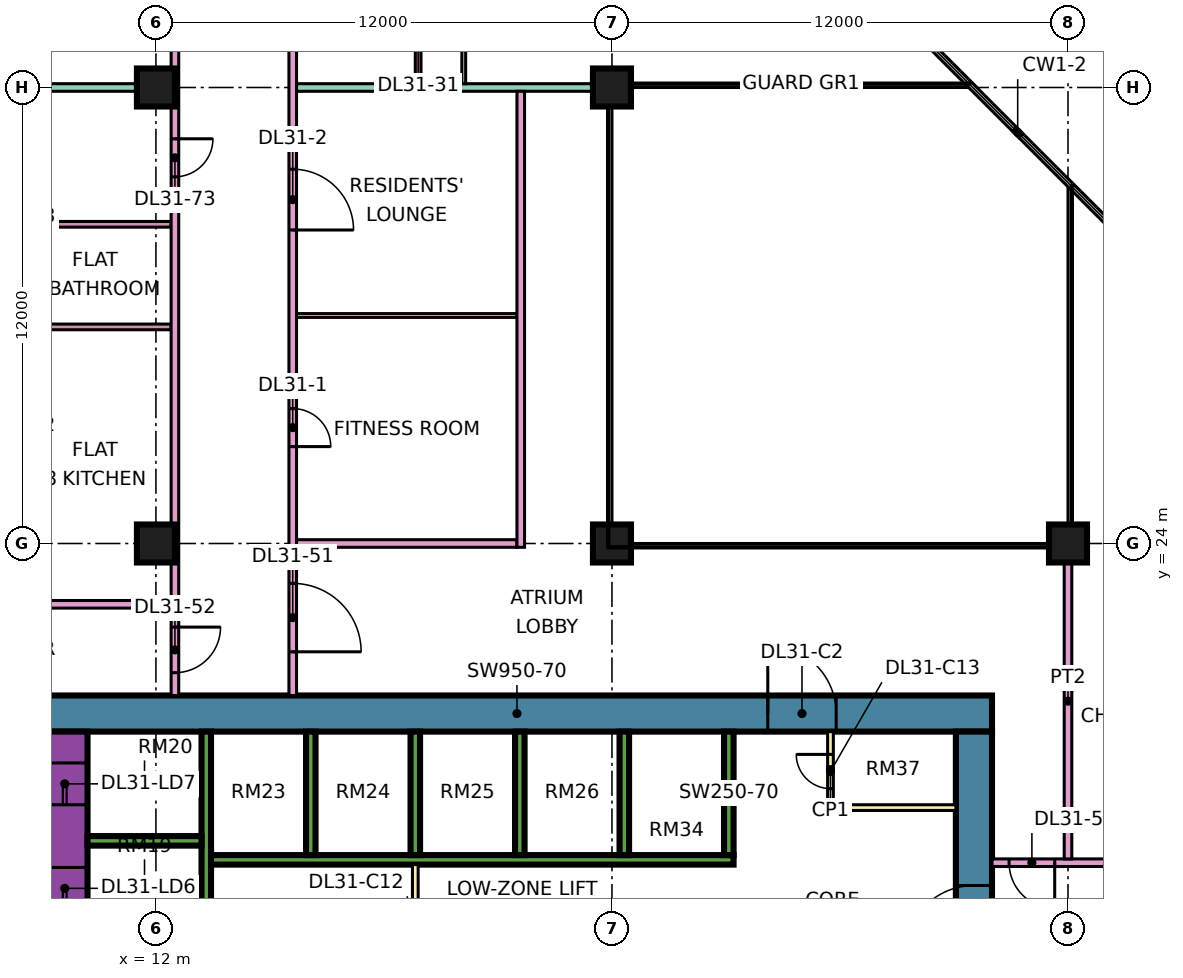
"""IFC4 building model, lengths in metres.
Left out: names, types, materials, properties, quantities, classifications, styles, units other than length and angle.
Written with IfcOpenShell. Run it as: python <this file> out.ifc"""

import sys

from ifc_helpers import new_model, si_unit, direction, frame, frame_2d, origin, origin_2d, place, context, subcontext, project, spatial, rectangle, extrude, element, fill, save


model = new_model("IFC4")
c1 = context("Model", 3, precision=1e-05, world=origin(), true_north=direction((0.0, 1.0)))
c2 = subcontext(c1, "Body", "Model", "MODEL_VIEW")
j1 = project(units=[si_unit("LENGTHUNIT", "METRE"), si_unit("PLANEANGLEUNIT", "RADIAN")], contexts=[c1])
p1 = place(None, origin())
s1 = spatial("IfcSite", under=j1, at=p1, CompositionType="ELEMENT")
p2 = place(p1, origin())
s2 = spatial("IfcBuilding", under=s1, at=p2, CompositionType="ELEMENT")
p3 = place(p2, frame((0.0, 0.0, 133.15)))
s3 = spatial("IfcBuildingStorey", under=s2, at=p3, CompositionType="ELEMENT", Elevation=133.15)
for number, where, z_axis, x_axis in (
    (1, (12.0, 24.0, 0.0), (0.0, 0.0, 1.0), (1.0, 0.0, 0.0)),
    (2, (12.0, 36.0, 0.0), (0.0, 0.0, 1.0), (1.0, 0.0, 0.0)),
    (3, (24.0, 24.0, 0.0), (0.0, 0.0, 1.0), (1.0, 0.0, 0.0)),
    (4, (24.0, 36.0, 0.0), (0.0, 0.0, 1.0), (1.0, 0.0, 0.0)),
    (5, (36.0, 24.0, 0.0), (0.0, 0.0, 1.0), (1.0, 0.0, 0.0)),
):
    element("IfcColumn", number, at=place(p3, frame(where, z_axis=z_axis, x_axis=x_axis)), inside=s3, PredefinedType="COLUMN", context=c2, shape_type="SweptSolid", body=[
        extrude(rectangle(XDim=1.0, YDim=1.0, at=origin_2d()), origin(), (0.0, 0.0, 1.0), 3.75),
    ])
p4 = place(p3, frame((9.0, 19.525, 0.0), z_axis=(0.0, 0.0, 1.0), x_axis=(1.0, 0.0, 0.0)))
e6 = element("IfcWall", 6, at=p4, inside=s3, PredefinedType="SHEAR", context=c2, shape_type="SweptSolid", body=[
    extrude(rectangle(XDim=25.0, YDim=0.95, at=frame_2d((12.5, 0.0))), origin(), (0.0, 0.0, 1.0), 3.75),
])
p5 = place(p4, frame((19.1, 0.0, 0.0)))
e7 = element("IfcOpeningElement", 7, at=p5, cuts=e6, PredefinedType="OPENING", context=c2, shape_type="SweptSolid", body=[
    extrude(rectangle(XDim=1.8, YDim=2.4, at=frame_2d((0.9, 1.2))), frame((0.0, 0.485, 0.0), z_axis=(0.0, -1.0, 0.0), x_axis=(1.0, 0.0, 0.0)), (0.0, 0.0, 1.0), 0.97),
])
p6 = place(p3, frame((9.6, 7.95, 0.0), z_axis=(0.0, 0.0, 1.0), x_axis=(0.0, 1.0, 0.0)))
e8 = element("IfcWall", 8, at=p6, inside=s3, PredefinedType="SHEAR", context=c2, shape_type="SweptSolid", body=[
    extrude(rectangle(XDim=11.1, YDim=1.2, at=frame_2d((5.55, 0.0))), origin(), (0.0, 0.0, 1.0), 3.75),
])
p7 = place(p6, frame((3.925, 0.0, 0.0)))
e9 = element("IfcOpeningElement", 9, at=p7, cuts=e8, PredefinedType="OPENING", context=c2, shape_type="SweptSolid", body=[
    extrude(rectangle(XDim=1.1, YDim=2.2, at=frame_2d((0.55, 1.1))), frame((0.0, 0.61, 0.0), z_axis=(0.0, -1.0, 0.0), x_axis=(1.0, 0.0, 0.0)), (0.0, 0.0, 1.0), 1.22),
])
p8 = place(p6, frame((6.425, 0.0, 0.0)))
e10 = element("IfcOpeningElement", 10, at=p8, cuts=e8, PredefinedType="OPENING", context=c2, shape_type="SweptSolid", body=[
    extrude(rectangle(XDim=1.1, YDim=2.2, at=frame_2d((0.55, 1.1))), frame((0.0, 0.61, 0.0), z_axis=(0.0, -1.0, 0.0), x_axis=(1.0, 0.0, 0.0)), (0.0, 0.0, 1.0), 1.22),
])
p9 = place(p6, frame((9.175, 0.0, 0.0)))
e11 = element("IfcOpeningElement", 11, at=p9, cuts=e8, PredefinedType="OPENING", context=c2, shape_type="SweptSolid", body=[
    extrude(rectangle(XDim=1.1, YDim=2.2, at=frame_2d((0.55, 1.1))), frame((0.0, 0.61, 0.0), z_axis=(0.0, -1.0, 0.0), x_axis=(1.0, 0.0, 0.0)), (0.0, 0.0, 1.0), 1.22),
])
p10 = place(p6, frame((1.6, 0.0, 0.0)))
e12 = element("IfcOpeningElement", 12, at=p10, cuts=e8, PredefinedType="OPENING", context=c2, shape_type="SweptSolid", body=[
    extrude(rectangle(XDim=0.9, YDim=2.1, at=frame_2d((0.45, 1.05))), frame((0.0, 0.61, 0.0), z_axis=(0.0, -1.0, 0.0), x_axis=(1.0, 0.0, 0.0)), (0.0, 0.0, 1.0), 1.22),
])
p11 = place(p3, frame((33.525, 7.95, 0.0), z_axis=(0.0, 0.0, 1.0), x_axis=(0.0, 1.0, 0.0)))
e13 = element("IfcWall", 13, at=p11, inside=s3, PredefinedType="SHEAR", context=c2, shape_type="SweptSolid", body=[
    extrude(rectangle(XDim=11.1, YDim=0.95, at=frame_2d((5.55, 0.0))), origin(), (0.0, 0.0, 1.0), 3.75),
])
p12 = place(p11, frame((5.25, 0.0, 0.0)))
e14 = element("IfcOpeningElement", 14, at=p12, cuts=e13, PredefinedType="OPENING", context=c2, shape_type="SweptSolid", body=[
    extrude(rectangle(XDim=1.8, YDim=2.4, at=frame_2d((0.9, 1.2))), frame((0.0, 0.485, 0.0), z_axis=(0.0, -1.0, 0.0), x_axis=(1.0, 0.0, 0.0)), (0.0, 0.0, 1.0), 0.97),
])
p13 = place(p3, frame((13.325, 7.95, 0.0), z_axis=(0.0, 0.0, 1.0), x_axis=(0.0, 1.0, 0.0)))
e15 = element("IfcWall", 15, at=p13, inside=s3, PredefinedType="SHEAR", context=c2, shape_type="SweptSolid", body=[
    extrude(rectangle(XDim=11.1, YDim=0.25, at=frame_2d((5.55, 0.0))), origin(), (0.0, 0.0, 1.0), 3.75),
])
p14 = place(p3, frame((13.45, 15.675, 0.0), z_axis=(0.0, 0.0, 1.0), x_axis=(1.0, 0.0, 0.0)))
e16 = element("IfcWall", 16, at=p14, inside=s3, PredefinedType="SHEAR", context=c2, shape_type="SweptSolid", body=[
    extrude(rectangle(XDim=13.75, YDim=0.25, at=frame_2d((6.875, 0.0))), origin(), (0.0, 0.0, 1.0), 3.75),
])
p15 = place(p3, frame((10.2, 16.175, 0.0), z_axis=(0.0, 0.0, 1.0), x_axis=(1.0, 0.0, 0.0)))
e17 = element("IfcWall", 17, at=p15, inside=s3, PredefinedType="SHEAR", context=c2, shape_type="SweptSolid", body=[
    extrude(rectangle(XDim=3.0, YDim=0.25, at=frame_2d((1.5, 0.0))), origin(), (0.0, 0.0, 1.0), 3.75),
])
for number, where, z_axis, x_axis in (
    (18, (16.075, 15.8, 0.0), (0.0, 0.0, 1.0), (0.0, 1.0, 0.0)),
    (19, (18.825, 15.8, 0.0), (0.0, 0.0, 1.0), (0.0, 1.0, 0.0)),
    (20, (21.575, 15.8, 0.0), (0.0, 0.0, 1.0), (0.0, 1.0, 0.0)),
    (21, (24.325, 15.8, 0.0), (0.0, 0.0, 1.0), (0.0, 1.0, 0.0)),
    (22, (27.075, 15.8, 0.0), (0.0, 0.0, 1.0), (0.0, 1.0, 0.0)),
):
    element("IfcWall", number, at=place(p3, frame(where, z_axis=z_axis, x_axis=x_axis)), inside=s3, PredefinedType="SHEAR", context=c2, shape_type="SweptSolid", body=[
        extrude(rectangle(XDim=3.25, YDim=0.25, at=frame_2d((1.625, 0.0))), origin(), (0.0, 0.0, 1.0), 3.75),
    ])
p16 = place(p3, frame((18.825, 11.45, 0.0), z_axis=(0.0, 0.0, 1.0), x_axis=(0.0, 1.0, 0.0)))
e23 = element("IfcWall", 23, at=p16, inside=s3, PredefinedType="PARTITIONING", context=c2, shape_type="SweptSolid", body=[
    extrude(rectangle(XDim=4.1, YDim=0.15, at=frame_2d((2.05, 0.0))), origin(), (0.0, 0.0, 1.0), 3.35),
])
p17 = place(p16, frame((1.15, 0.0, 0.0)))
e24 = element("IfcOpeningElement", 24, at=p17, cuts=e23, PredefinedType="OPENING", context=c2, shape_type="SweptSolid", body=[
    extrude(rectangle(XDim=1.8, YDim=2.4, at=frame_2d((0.9, 1.2))), frame((0.0, 0.085, 0.0), z_axis=(0.0, -1.0, 0.0), x_axis=(1.0, 0.0, 0.0)), (0.0, 0.0, 1.0), 0.17),
])
p18 = place(p3, frame((29.75, 17.05, 0.0), z_axis=(0.0, 0.0, 1.0), x_axis=(0.0, 1.0, 0.0)))
e25 = element("IfcWall", 25, at=p18, inside=s3, PredefinedType="PARTITIONING", context=c2, shape_type="SweptSolid", body=[
    extrude(rectangle(XDim=2.0, YDim=0.15, at=frame_2d((1.0, 0.0))), origin(), (0.0, 0.0, 1.0), 3.35),
])
p19 = place(p18, frame((0.5, 0.0, 0.0)))
e26 = element("IfcOpeningElement", 26, at=p19, cuts=e25, PredefinedType="OPENING", context=c2, shape_type="SweptSolid", body=[
    extrude(rectangle(XDim=0.9, YDim=2.1, at=frame_2d((0.45, 1.05))), frame((0.0, 0.085, 0.0), z_axis=(0.0, -1.0, 0.0), x_axis=(1.0, 0.0, 0.0)), (0.0, 0.0, 1.0), 0.17),
])
p20 = place(p3, frame((29.75, 17.05, 0.0), z_axis=(0.0, 0.0, 1.0), x_axis=(1.0, 0.0, 0.0)))
e27 = element("IfcWall", 27, at=p20, inside=s3, PredefinedType="PARTITIONING", context=c2, shape_type="SweptSolid", body=[
    extrude(rectangle(XDim=3.3, YDim=0.15, at=frame_2d((1.65, 0.0))), origin(), (0.0, 0.0, 1.0), 3.35),
])
p21 = place(p3, frame((0.0, 36.0, 0.0), z_axis=(0.0, 0.0, 1.0), x_axis=(1.0, 0.0, 0.0)))
e28 = element("IfcWall", 28, at=p21, inside=s3, PredefinedType="PARTITIONING", context=c2, shape_type="SweptSolid", body=[
    extrude(rectangle(XDim=12.4, YDim=0.2, at=frame_2d((6.2, 0.0))), origin(), (0.0, 0.0, 1.0), 3.35),
])
p22 = place(p3, frame((0.074, 22.4, 0.0), z_axis=(0.0, 0.0, 1.0), x_axis=(1.0, 0.0, 0.0)))
e29 = element("IfcWall", 29, at=p22, inside=s3, PredefinedType="PARTITIONING", context=c2, shape_type="SweptSolid", body=[
    extrude(rectangle(XDim=12.326, YDim=0.2, at=frame_2d((6.163, 0.0))), origin(), (0.0, 0.0, 1.0), 3.35),
])
for number, where, z_axis, x_axis in (
    (30, (8.375, 29.7, 0.0), (0.0, 0.0, 1.0), (1.0, 0.0, 0.0)),
    (31, (8.375, 32.4, 0.0), (0.0, 0.0, 1.0), (1.0, 0.0, 0.0)),
):
    element("IfcWall", number, at=place(p3, frame(where, z_axis=z_axis, x_axis=x_axis)), inside=s3, PredefinedType="PARTITIONING", context=c2, shape_type="SweptSolid", body=[
        extrude(rectangle(XDim=4.025, YDim=0.15, at=frame_2d((2.012, 0.0))), origin(), (0.0, 0.0, 1.0), 3.35),
    ])
p23 = place(p3, frame((12.5, 20.0, 0.0), z_axis=(0.0, 0.0, 1.0), x_axis=(0.0, 1.0, 0.0)))
e32 = element("IfcWall", 32, at=p23, inside=s3, PredefinedType="PARTITIONING", context=c2, shape_type="SweptSolid", body=[
    extrude(rectangle(XDim=42.926, YDim=0.2, at=frame_2d((21.463, 0.0))), origin(), (0.0, 0.0, 1.0), 3.35),
])
p24 = place(p23, frame((17.25, 0.0, 0.0)))
e33 = element("IfcOpeningElement", 33, at=p24, cuts=e32, PredefinedType="OPENING", context=c2, shape_type="SweptSolid", body=[
    extrude(rectangle(XDim=1.0, YDim=2.1, at=frame_2d((0.5, 1.05))), frame((0.0, 0.11, 0.0), z_axis=(0.0, -1.0, 0.0), x_axis=(1.0, 0.0, 0.0)), (0.0, 0.0, 1.0), 0.22),
])
p25 = place(p23, frame((40.8, 0.0, 0.0)))
e34 = element("IfcOpeningElement", 34, at=p25, cuts=e32, PredefinedType="OPENING", context=c2, shape_type="SweptSolid", body=[
    extrude(rectangle(XDim=1.0, YDim=2.1, at=frame_2d((0.5, 1.05))), frame((0.0, 0.11, 0.0), z_axis=(0.0, -1.0, 0.0), x_axis=(1.0, 0.0, 0.0)), (0.0, 0.0, 1.0), 0.22),
])
p26 = place(p23, frame((0.6, 0.0, 0.0)))
e35 = element("IfcOpeningElement", 35, at=p26, cuts=e32, PredefinedType="OPENING", context=c2, shape_type="SweptSolid", body=[
    extrude(rectangle(XDim=1.2, YDim=2.1, at=frame_2d((0.6, 1.05))), frame((0.0, 0.11, 0.0), z_axis=(0.0, -1.0, 0.0), x_axis=(1.0, 0.0, 0.0)), (0.0, 0.0, 1.0), 0.22),
])
p27 = place(p23, frame((13.65, 0.0, 0.0)))
e36 = element("IfcOpeningElement", 36, at=p27, cuts=e32, PredefinedType="OPENING", context=c2, shape_type="SweptSolid", body=[
    extrude(rectangle(XDim=1.0, YDim=2.1, at=frame_2d((0.5, 1.05))), frame((0.0, 0.11, 0.0), z_axis=(0.0, -1.0, 0.0), x_axis=(1.0, 0.0, 0.0)), (0.0, 0.0, 1.0), 0.22),
])
p28 = place(p3, frame((15.6, 20.0, 0.0), z_axis=(0.0, 0.0, 1.0), x_axis=(0.0, 1.0, 0.0)))
e37 = element("IfcWall", 37, at=p28, inside=s3, PredefinedType="PARTITIONING", context=c2, shape_type="SweptSolid", body=[
    extrude(rectangle(XDim=27.775, YDim=0.2, at=frame_2d((13.887, 0.0))), origin(), (0.0, 0.0, 1.0), 3.35),
])
p29 = place(p28, frame((6.55, 0.0, 0.0)))
e38 = element("IfcOpeningElement", 38, at=p29, cuts=e37, PredefinedType="OPENING", context=c2, shape_type="SweptSolid", body=[
    extrude(rectangle(XDim=1.0, YDim=2.1, at=frame_2d((0.5, 1.05))), frame((0.0, 0.11, 0.0), z_axis=(0.0, -1.0, 0.0), x_axis=(1.0, 0.0, 0.0)), (0.0, 0.0, 1.0), 0.22),
])
p30 = place(p28, frame((12.25, 0.0, 0.0)))
e39 = element("IfcOpeningElement", 39, at=p30, cuts=e37, PredefinedType="OPENING", context=c2, shape_type="SweptSolid", body=[
    extrude(rectangle(XDim=1.6, YDim=2.1, at=frame_2d((0.8, 1.05))), frame((0.0, 0.11, 0.0), z_axis=(0.0, -1.0, 0.0), x_axis=(1.0, 0.0, 0.0)), (0.0, 0.0, 1.0), 0.22),
])
p31 = place(p28, frame((23.35, 0.0, 0.0)))
e40 = element("IfcOpeningElement", 40, at=p31, cuts=e37, PredefinedType="OPENING", context=c2, shape_type="SweptSolid", body=[
    extrude(rectangle(XDim=1.0, YDim=2.1, at=frame_2d((0.5, 1.05))), frame((0.0, 0.11, 0.0), z_axis=(0.0, -1.0, 0.0), x_axis=(1.0, 0.0, 0.0)), (0.0, 0.0, 1.0), 0.22),
])
p32 = place(p28, frame((1.15, 0.0, 0.0)))
e41 = element("IfcOpeningElement", 41, at=p32, cuts=e37, PredefinedType="OPENING", context=c2, shape_type="SweptSolid", body=[
    extrude(rectangle(XDim=1.8, YDim=2.1, at=frame_2d((0.9, 1.05))), frame((0.0, 0.11, 0.0), z_axis=(0.0, -1.0, 0.0), x_axis=(1.0, 0.0, 0.0)), (0.0, 0.0, 1.0), 0.22),
])
p33 = place(p28, frame((25.9, 0.0, 0.0)))
e42 = element("IfcOpeningElement", 42, at=p33, cuts=e37, PredefinedType="OPENING", context=c2, shape_type="SweptSolid", body=[
    extrude(rectangle(XDim=1.0, YDim=2.1, at=frame_2d((0.5, 1.05))), frame((0.0, 0.11, 0.0), z_axis=(0.0, -1.0, 0.0), x_axis=(1.0, 0.0, 0.0)), (0.0, 0.0, 1.0), 0.22),
])
p34 = place(p3, frame((15.7, 24.0, 0.0), z_axis=(0.0, 0.0, 1.0), x_axis=(1.0, 0.0, 0.0)))
e43 = element("IfcWall", 43, at=p34, inside=s3, PredefinedType="PARTITIONING", context=c2, shape_type="SweptSolid", body=[
    extrude(rectangle(XDim=5.8, YDim=0.2, at=frame_2d((2.9, 0.0))), origin(), (0.0, 0.0, 1.0), 3.35),
])
p35 = place(p3, frame((15.7, 30.0, 0.0), z_axis=(0.0, 0.0, 1.0), x_axis=(1.0, 0.0, 0.0)))
e44 = element("IfcWall", 44, at=p35, inside=s3, PredefinedType="PARTITIONING", context=c2, shape_type="SweptSolid", body=[
    extrude(rectangle(XDim=5.8, YDim=0.1, at=frame_2d((2.9, 0.0))), origin(), (0.0, 0.0, 1.0), 3.35),
])
p36 = place(p3, frame((15.7, 36.0, 0.0), z_axis=(0.0, 0.0, 1.0), x_axis=(1.0, 0.0, 0.0)))
e45 = element("IfcWall", 45, at=p36, inside=s3, PredefinedType="PARTITIONING", context=c2, shape_type="SweptSolid", body=[
    extrude(rectangle(XDim=8.3, YDim=0.2, at=frame_2d((4.15, 0.0))), origin(), (0.0, 0.0, 1.0), 3.35),
])
p37 = place(p3, frame((18.9, 36.1, 0.0), z_axis=(0.0, 0.0, 1.0), x_axis=(0.0, 1.0, 0.0)))
e46 = element("IfcWall", 46, at=p37, inside=s3, PredefinedType="PARTITIONING", context=c2, shape_type="SweptSolid", body=[
    extrude(rectangle(XDim=6.575, YDim=0.15, at=frame_2d((3.288, 0.0))), origin(), (0.0, 0.0, 1.0), 3.35),
])
p38 = place(p37, frame((1.1, 0.0, 0.0)))
e47 = element("IfcOpeningElement", 47, at=p38, cuts=e46, PredefinedType="OPENING", context=c2, shape_type="SweptSolid", body=[
    extrude(rectangle(XDim=0.9, YDim=2.1, at=frame_2d((0.45, 1.05))), frame((0.0, 0.085, 0.0), z_axis=(0.0, -1.0, 0.0), x_axis=(1.0, 0.0, 0.0)), (0.0, 0.0, 1.0), 0.17),
])
p39 = place(p3, frame((20.1, 36.1, 0.0), z_axis=(0.0, 0.0, 1.0), x_axis=(0.0, 1.0, 0.0)))
e48 = element("IfcWall", 48, at=p39, inside=s3, PredefinedType="PARTITIONING", context=c2, shape_type="SweptSolid", body=[
    extrude(rectangle(XDim=5.95, YDim=0.1, at=frame_2d((2.975, 0.0))), origin(), (0.0, 0.0, 1.0), 3.35),
])
p40 = place(p39, frame((0.95, 0.0, 0.0)))
e49 = element("IfcOpeningElement", 49, at=p40, cuts=e48, PredefinedType="OPENING", context=c2, shape_type="SweptSolid", body=[
    extrude(rectangle(XDim=0.9, YDim=2.1, at=frame_2d((0.45, 1.05))), frame((0.0, 0.06, 0.0), z_axis=(0.0, -1.0, 0.0), x_axis=(1.0, 0.0, 0.0)), (0.0, 0.0, 1.0), 0.12),
])
p41 = place(p39, frame((3.95, 0.0, 0.0)))
e50 = element("IfcOpeningElement", 50, at=p41, cuts=e48, PredefinedType="OPENING", context=c2, shape_type="SweptSolid", body=[
    extrude(rectangle(XDim=0.9, YDim=2.1, at=frame_2d((0.45, 1.05))), frame((0.0, 0.06, 0.0), z_axis=(0.0, -1.0, 0.0), x_axis=(1.0, 0.0, 0.0)), (0.0, 0.0, 1.0), 0.12),
])
p42 = place(p3, frame((21.6, 23.9, 0.0), z_axis=(0.0, 0.0, 1.0), x_axis=(0.0, 1.0, 0.0)))
e51 = element("IfcWall", 51, at=p42, inside=s3, PredefinedType="PARTITIONING", context=c2, shape_type="SweptSolid", body=[
    extrude(rectangle(XDim=12.0, YDim=0.2, at=frame_2d((6.0, 0.0))), origin(), (0.0, 0.0, 1.0), 3.35),
])
p43 = place(p3, frame((34.0, 15.6, 0.0), z_axis=(0.0, 0.0, 1.0), x_axis=(1.0, 0.0, 0.0)))
e52 = element("IfcWall", 52, at=p43, inside=s3, PredefinedType="PARTITIONING", context=c2, shape_type="SweptSolid", body=[
    extrude(rectangle(XDim=10.35, YDim=0.2, at=frame_2d((5.175, 0.0))), origin(), (0.0, 0.0, 1.0), 3.35),
])
p44 = place(p43, frame((5.6, 0.0, 0.0)))
e53 = element("IfcOpeningElement", 53, at=p44, cuts=e52, PredefinedType="OPENING", context=c2, shape_type="SweptSolid", body=[
    extrude(rectangle(XDim=1.0, YDim=2.1, at=frame_2d((0.5, 1.05))), frame((0.0, 0.11, 0.0), z_axis=(0.0, -1.0, 0.0), x_axis=(1.0, 0.0, 0.0)), (0.0, 0.0, 1.0), 0.22),
])
p45 = place(p43, frame((0.45, 0.0, 0.0)))
e54 = element("IfcOpeningElement", 54, at=p45, cuts=e52, PredefinedType="OPENING", context=c2, shape_type="SweptSolid", body=[
    extrude(rectangle(XDim=1.2, YDim=2.1, at=frame_2d((0.6, 1.05))), frame((0.0, 0.11, 0.0), z_axis=(0.0, -1.0, 0.0), x_axis=(1.0, 0.0, 0.0)), (0.0, 0.0, 1.0), 0.22),
])
p46 = place(p3, frame((36.0, 15.7, 0.0), z_axis=(0.0, 0.0, 1.0), x_axis=(0.0, 1.0, 0.0)))
e55 = element("IfcWall", 55, at=p46, inside=s3, PredefinedType="PARTITIONING", context=c2, shape_type="SweptSolid", body=[
    extrude(rectangle(XDim=8.3, YDim=0.2, at=frame_2d((4.15, 0.0))), origin(), (0.0, 0.0, 1.0), 3.35),
])
p47 = place(p8, origin())
e56 = element("IfcDoor", 56, at=p47, inside=s3, OperationType="DOUBLE_DOOR_SLIDING", PredefinedType="DOOR", context=c2, shape_type="SweptSolid", body=[
    extrude(rectangle(XDim=1.1, YDim=2.2, at=frame_2d((0.55, 1.1))), frame((0.0, 0.025, 0.0), z_axis=(0.0, -1.0, 0.0), x_axis=(1.0, 0.0, 0.0)), (0.0, 0.0, 1.0), 0.05),
])
fill(e10, e56)
p48 = place(p9, origin())
e57 = element("IfcDoor", 57, at=p48, inside=s3, OperationType="DOUBLE_DOOR_SLIDING", PredefinedType="DOOR", context=c2, shape_type="SweptSolid", body=[
    extrude(rectangle(XDim=1.1, YDim=2.2, at=frame_2d((0.55, 1.1))), frame((0.0, 0.025, 0.0), z_axis=(0.0, -1.0, 0.0), x_axis=(1.0, 0.0, 0.0)), (0.0, 0.0, 1.0), 0.05),
])
fill(e11, e57)
p49 = place(p12, origin())
e58 = element("IfcDoor", 58, at=p49, inside=s3, OperationType="DOUBLE_DOOR_SINGLE_SWING", PredefinedType="DOOR", context=c2, shape_type="SweptSolid", body=[
    extrude(rectangle(XDim=1.8, YDim=2.4, at=frame_2d((0.9, 1.2))), frame((0.0, 0.025, 0.0), z_axis=(0.0, -1.0, 0.0), x_axis=(1.0, 0.0, 0.0)), (0.0, 0.0, 1.0), 0.05),
])
fill(e14, e58)
p50 = place(p5, origin())
e59 = element("IfcDoor", 59, at=p50, inside=s3, OperationType="DOUBLE_DOOR_SINGLE_SWING", PredefinedType="DOOR", context=c2, shape_type="SweptSolid", body=[
    extrude(rectangle(XDim=1.8, YDim=2.4, at=frame_2d((0.9, 1.2))), frame((0.0, 0.025, 0.0), z_axis=(0.0, -1.0, 0.0), x_axis=(1.0, 0.0, 0.0)), (0.0, 0.0, 1.0), 0.05),
])
fill(e7, e59)
p51 = place(p19, frame((0.9, 0.0, 0.0), z_axis=(0.0, 0.0, 1.0), x_axis=(-1.0, 0.0, 0.0)))
e60 = element("IfcDoor", 60, at=p51, inside=s3, OperationType="SINGLE_SWING_RIGHT", PredefinedType="DOOR", context=c2, shape_type="SweptSolid", body=[
    extrude(rectangle(XDim=0.9, YDim=2.1, at=frame_2d((0.45, 1.05))), frame((0.0, 0.025, 0.0), z_axis=(0.0, -1.0, 0.0), x_axis=(1.0, 0.0, 0.0)), (0.0, 0.0, 1.0), 0.05),
])
fill(e26, e60)
p52 = place(p29, frame((1.0, 0.0, 0.0), z_axis=(0.0, 0.0, 1.0), x_axis=(-1.0, 0.0, 0.0)))
e61 = element("IfcDoor", 61, at=p52, inside=s3, OperationType="SINGLE_SWING_LEFT", PredefinedType="DOOR", context=c2, shape_type="SweptSolid", body=[
    extrude(rectangle(XDim=1.0, YDim=2.1, at=frame_2d((0.5, 1.05))), frame((0.0, 0.025, 0.0), z_axis=(0.0, -1.0, 0.0), x_axis=(1.0, 0.0, 0.0)), (0.0, 0.0, 1.0), 0.05),
])
fill(e38, e61)
p53 = place(p30, frame((1.6, 0.0, 0.0), z_axis=(0.0, 0.0, 1.0), x_axis=(-1.0, 0.0, 0.0)))
e62 = element("IfcDoor", 62, at=p53, inside=s3, OperationType="DOUBLE_DOOR_SINGLE_SWING", PredefinedType="DOOR", context=c2, shape_type="SweptSolid", body=[
    extrude(rectangle(XDim=1.6, YDim=2.1, at=frame_2d((0.8, 1.05))), frame((0.0, 0.025, 0.0), z_axis=(0.0, -1.0, 0.0), x_axis=(1.0, 0.0, 0.0)), (0.0, 0.0, 1.0), 0.05),
])
fill(e39, e62)
p54 = place(p45, origin())
e63 = element("IfcDoor", 63, at=p54, inside=s3, OperationType="SINGLE_SWING_RIGHT", PredefinedType="DOOR", context=c2, shape_type="SweptSolid", body=[
    extrude(rectangle(XDim=1.2, YDim=2.1, at=frame_2d((0.6, 1.05))), frame((0.0, 0.025, 0.0), z_axis=(0.0, -1.0, 0.0), x_axis=(1.0, 0.0, 0.0)), (0.0, 0.0, 1.0), 0.05),
])
fill(e54, e63)
p55 = place(p32, frame((1.8, 0.0, 0.0), z_axis=(0.0, 0.0, 1.0), x_axis=(-1.0, 0.0, 0.0)))
e64 = element("IfcDoor", 64, at=p55, inside=s3, OperationType="DOUBLE_DOOR_SINGLE_SWING", PredefinedType="DOOR", context=c2, shape_type="SweptSolid", body=[
    extrude(rectangle(XDim=1.8, YDim=2.1, at=frame_2d((0.9, 1.05))), frame((0.0, 0.025, 0.0), z_axis=(0.0, -1.0, 0.0), x_axis=(1.0, 0.0, 0.0)), (0.0, 0.0, 1.0), 0.05),
])
fill(e41, e64)
p56 = place(p26, origin())
e65 = element("IfcDoor", 65, at=p56, inside=s3, OperationType="SINGLE_SWING_RIGHT", PredefinedType="DOOR", context=c2, shape_type="SweptSolid", body=[
    extrude(rectangle(XDim=1.2, YDim=2.1, at=frame_2d((0.6, 1.05))), frame((0.0, 0.025, 0.0), z_axis=(0.0, -1.0, 0.0), x_axis=(1.0, 0.0, 0.0)), (0.0, 0.0, 1.0), 0.05),
])
fill(e35, e65)
p57 = place(p27, origin())
e66 = element("IfcDoor", 66, at=p57, inside=s3, OperationType="SINGLE_SWING_RIGHT", PredefinedType="DOOR", context=c2, shape_type="SweptSolid", body=[
    extrude(rectangle(XDim=1.0, YDim=2.1, at=frame_2d((0.5, 1.05))), frame((0.0, 0.025, 0.0), z_axis=(0.0, -1.0, 0.0), x_axis=(1.0, 0.0, 0.0)), (0.0, 0.0, 1.0), 0.05),
])
fill(e36, e66)
save(model, sys.argv[1])
